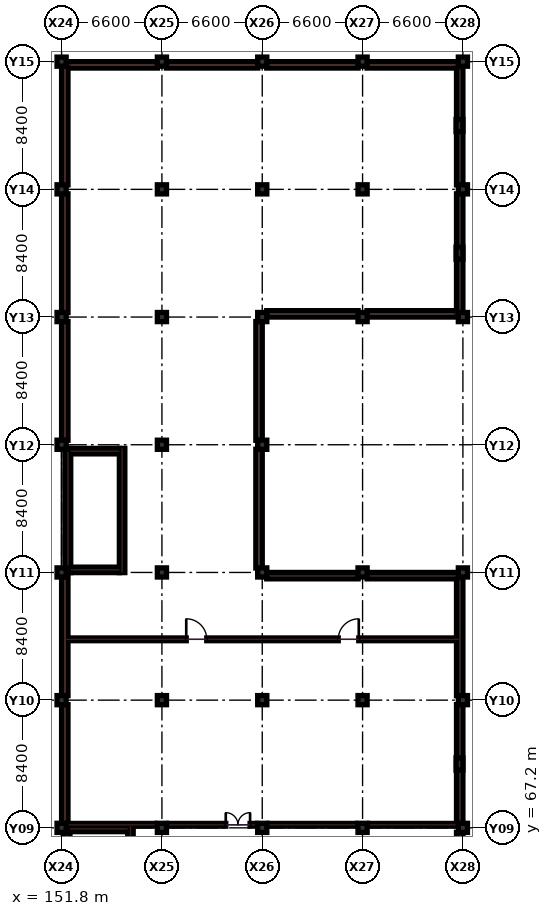
"""IFC4 building model, lengths in metres.
Left out: names, types, materials, properties, quantities, classifications, styles, units other than length and angle.
Written with IfcOpenShell. Run it as: python <this file> out.ifc"""

import sys

from ifc_helpers import new_model, si_unit, direction, frame, frame_2d, origin, origin_2d, place, context, subcontext, project, spatial, rectangle, extrude, element, fill, save


model = new_model("IFC4")
c1 = context("Model", 3, precision=1e-05, world=origin(), true_north=direction((0.0, 1.0)))
c2 = subcontext(c1, "Body", "Model", "MODEL_VIEW")
j1 = project(units=[si_unit("LENGTHUNIT", "METRE"), si_unit("PLANEANGLEUNIT", "RADIAN")], contexts=[c1])
p1 = place(None, origin())
s1 = spatial("IfcSite", under=j1, at=p1, CompositionType="ELEMENT")
p2 = place(p1, origin())
s2 = spatial("IfcBuilding", under=s1, at=p2, CompositionType="ELEMENT")
p3 = place(p2, frame((0.0, 0.0, -4.5)))
s3 = spatial("IfcBuildingStorey", under=s2, at=p3, CompositionType="ELEMENT", Elevation=-4.5)
for number, where, z_axis, x_axis in (
    (1, (151.8, 67.2, 0.0), (0.0, 0.0, 1.0), (1.0, 0.0, 0.0)),
    (2, (151.8, 75.6, 0.0), (0.0, 0.0, 1.0), (1.0, 0.0, 0.0)),
    (3, (151.8, 84.0, 0.0), (0.0, 0.0, 1.0), (1.0, 0.0, 0.0)),
    (4, (151.8, 92.4, 0.0), (0.0, 0.0, 1.0), (1.0, 0.0, 0.0)),
    (5, (151.8, 100.8, 0.0), (0.0, 0.0, 1.0), (1.0, 0.0, 0.0)),
    (6, (151.8, 109.2, 0.0), (0.0, 0.0, 1.0), (1.0, 0.0, 0.0)),
    (7, (151.8, 117.6, 0.0), (0.0, 0.0, 1.0), (1.0, 0.0, 0.0)),
    (8, (158.4, 67.2, 0.0), (0.0, 0.0, 1.0), (1.0, 0.0, 0.0)),
    (9, (158.4, 75.6, 0.0), (0.0, 0.0, 1.0), (1.0, 0.0, 0.0)),
    (10, (158.4, 84.0, 0.0), (0.0, 0.0, 1.0), (1.0, 0.0, 0.0)),
    (11, (158.4, 92.4, 0.0), (0.0, 0.0, 1.0), (1.0, 0.0, 0.0)),
    (12, (158.4, 100.8, 0.0), (0.0, 0.0, 1.0), (1.0, 0.0, 0.0)),
    (13, (158.4, 109.2, 0.0), (0.0, 0.0, 1.0), (1.0, 0.0, 0.0)),
    (14, (158.4, 117.6, 0.0), (0.0, 0.0, 1.0), (1.0, 0.0, 0.0)),
    (15, (165.0, 67.2, 0.0), (0.0, 0.0, 1.0), (1.0, 0.0, 0.0)),
    (16, (165.0, 75.6, 0.0), (0.0, 0.0, 1.0), (1.0, 0.0, 0.0)),
    (17, (165.0, 84.0, 0.0), (0.0, 0.0, 1.0), (1.0, 0.0, 0.0)),
    (18, (165.0, 92.4, 0.0), (0.0, 0.0, 1.0), (1.0, 0.0, 0.0)),
    (19, (165.0, 100.8, 0.0), (0.0, 0.0, 1.0), (1.0, 0.0, 0.0)),
    (20, (165.0, 109.2, 0.0), (0.0, 0.0, 1.0), (1.0, 0.0, 0.0)),
    (21, (165.0, 117.6, 0.0), (0.0, 0.0, 1.0), (1.0, 0.0, 0.0)),
    (22, (171.6, 67.2, 0.0), (0.0, 0.0, 1.0), (1.0, 0.0, 0.0)),
    (23, (171.6, 75.6, 0.0), (0.0, 0.0, 1.0), (1.0, 0.0, 0.0)),
    (24, (171.6, 84.0, 0.0), (0.0, 0.0, 1.0), (1.0, 0.0, 0.0)),
    (25, (171.6, 100.8, 0.0), (0.0, 0.0, 1.0), (1.0, 0.0, 0.0)),
    (26, (171.6, 109.2, 0.0), (0.0, 0.0, 1.0), (1.0, 0.0, 0.0)),
    (27, (171.6, 117.6, 0.0), (0.0, 0.0, 1.0), (1.0, 0.0, 0.0)),
    (28, (178.2, 67.2, 0.0), (0.0, 0.0, 1.0), (1.0, 0.0, 0.0)),
    (29, (178.2, 75.6, 0.0), (0.0, 0.0, 1.0), (1.0, 0.0, 0.0)),
    (30, (178.2, 84.0, 0.0), (0.0, 0.0, 1.0), (1.0, 0.0, 0.0)),
    (31, (178.2, 100.8, 0.0), (0.0, 0.0, 1.0), (1.0, 0.0, 0.0)),
    (32, (178.2, 109.2, 0.0), (0.0, 0.0, 1.0), (1.0, 0.0, 0.0)),
    (33, (178.2, 117.6, 0.0), (0.0, 0.0, 1.0), (1.0, 0.0, 0.0)),
):
    element("IfcColumn", number, at=place(p3, frame(where, z_axis=z_axis, x_axis=x_axis)), inside=s3, PredefinedType="COLUMN", context=c2, shape_type="SweptSolid", body=[
        extrude(rectangle(XDim=0.6, YDim=0.6, at=origin_2d()), origin(), (0.0, 0.0, 1.0), 4.5),
    ])
for number, where, z_axis, x_axis in (
    (34, (177.975, 71.4, 0.0), (0.0, 0.0, 1.0), (1.0, 0.0, 0.0)),
    (35, (177.975, 105.0, 0.0), (0.0, 0.0, 1.0), (1.0, 0.0, 0.0)),
    (36, (177.975, 113.4, 0.0), (0.0, 0.0, 1.0), (1.0, 0.0, 0.0)),
):
    element("IfcColumn", number, at=place(p3, frame(where, z_axis=z_axis, x_axis=x_axis)), inside=s3, PredefinedType="PILASTER", context=c2, shape_type="SweptSolid", body=[
        extrude(rectangle(XDim=0.45, YDim=0.8, at=origin_2d()), origin(), (0.0, 0.0, 1.0), 4.5),
    ])
p4 = place(p3, frame((152.0, 67.4, 0.0), z_axis=(0.0, 0.0, 1.0), x_axis=(1.0, 0.0, 0.0)))
e37 = element("IfcWall", 37, at=p4, inside=s3, PredefinedType="SOLIDWALL", context=c2, shape_type="SweptSolid", body=[
    extrude(rectangle(XDim=5.95, YDim=0.18, at=frame_2d((2.975, 0.0))), origin(), (0.0, 0.0, 1.0), 3.29),
])
p5 = place(p3, frame((158.85, 67.4, 0.0), z_axis=(0.0, 0.0, 1.0), x_axis=(1.0, 0.0, 0.0)))
e38 = element("IfcWall", 38, at=p5, inside=s3, PredefinedType="SOLIDWALL", context=c2, shape_type="SweptSolid", body=[
    extrude(rectangle(XDim=5.7, YDim=0.18, at=frame_2d((2.85, 0.0))), origin(), (0.0, 0.0, 1.0), 3.275),
])
p6 = place(p5, frame((3.75, 0.0, 0.0)))
e39 = element("IfcOpeningElement", 39, at=p6, cuts=e38, PredefinedType="OPENING", context=c2, shape_type="SweptSolid", body=[
    extrude(rectangle(XDim=1.6, YDim=2.2, at=frame_2d((0.8, 1.1))), frame((0.0, 0.1, 0.0), z_axis=(0.0, -1.0, 0.0), x_axis=(1.0, 0.0, 0.0)), (0.0, 0.0, 1.0), 0.2),
])
p7 = place(p3, frame((165.45, 67.4, 0.0), z_axis=(0.0, 0.0, 1.0), x_axis=(1.0, 0.0, 0.0)))
e40 = element("IfcWall", 40, at=p7, inside=s3, PredefinedType="SOLIDWALL", context=c2, shape_type="SweptSolid", body=[
    extrude(rectangle(XDim=5.7, YDim=0.18, at=frame_2d((2.85, 0.0))), origin(), (0.0, 0.0, 1.0), 3.275),
])
p8 = place(p3, frame((172.05, 67.4, 0.0), z_axis=(0.0, 0.0, 1.0), x_axis=(1.0, 0.0, 0.0)))
e41 = element("IfcWall", 41, at=p8, inside=s3, PredefinedType="SOLIDWALL", context=c2, shape_type="SweptSolid", body=[
    extrude(rectangle(XDim=5.95, YDim=0.18, at=frame_2d((2.975, 0.0))), origin(), (0.0, 0.0, 1.0), 3.275),
])
p9 = place(p3, frame((152.0, 79.6, 0.0), z_axis=(0.0, 0.0, 1.0), x_axis=(1.0, 0.0, 0.0)))
e42 = element("IfcWall", 42, at=p9, inside=s3, PredefinedType="SOLIDWALL", context=c2, shape_type="SweptSolid", body=[
    extrude(rectangle(XDim=26.0, YDim=0.18, at=frame_2d((13.0, 0.0))), origin(), (0.0, 0.0, 1.0), 3.29),
])
p10 = place(p9, frame((8.0, 0.0, 0.0)))
e43 = element("IfcOpeningElement", 43, at=p10, cuts=e42, PredefinedType="OPENING", context=c2, shape_type="SweptSolid", body=[
    extrude(rectangle(XDim=1.35, YDim=2.2, at=frame_2d((0.675, 1.1))), frame((0.0, 0.1, 0.0), z_axis=(0.0, -1.0, 0.0), x_axis=(1.0, 0.0, 0.0)), (0.0, 0.0, 1.0), 0.2),
])
p11 = place(p9, frame((18.0, 0.0, 0.0)))
e44 = element("IfcOpeningElement", 44, at=p11, cuts=e42, PredefinedType="OPENING", context=c2, shape_type="SweptSolid", body=[
    extrude(rectangle(XDim=1.35, YDim=2.2, at=frame_2d((0.675, 1.1))), frame((0.0, 0.1, 0.0), z_axis=(0.0, -1.0, 0.0), x_axis=(1.0, 0.0, 0.0)), (0.0, 0.0, 1.0), 0.2),
])
p12 = place(p3, frame((152.01, 75.305, 0.0), z_axis=(0.0, 0.0, 1.0), x_axis=(0.0, -1.0, 0.0)))
e45 = element("IfcWall", 45, at=p12, inside=s3, PredefinedType="SOLIDWALL", context=c2, shape_type="SweptSolid", body=[
    extrude(rectangle(XDim=7.81, YDim=0.42, at=frame_2d((3.905, 0.0))), origin(), (0.0, 0.0, 1.0), 4.14),
])
p13 = place(p3, frame((152.01, 83.705, 0.0), z_axis=(0.0, 0.0, 1.0), x_axis=(0.0, -1.0, 0.0)))
e46 = element("IfcWall", 46, at=p13, inside=s3, PredefinedType="SOLIDWALL", context=c2, shape_type="SweptSolid", body=[
    extrude(rectangle(XDim=7.81, YDim=0.42, at=frame_2d((3.905, 0.0))), origin(), (0.0, 0.0, 1.0), 4.14),
])
p14 = place(p3, frame((152.01, 100.505, 0.0), z_axis=(0.0, 0.0, 1.0), x_axis=(0.0, -1.0, 0.0)))
e47 = element("IfcWall", 47, at=p14, inside=s3, PredefinedType="SOLIDWALL", context=c2, shape_type="SweptSolid", body=[
    extrude(rectangle(XDim=7.81, YDim=0.42, at=frame_2d((3.905, 0.0))), origin(), (0.0, 0.0, 1.0), 4.14),
])
p15 = place(p3, frame((152.01, 108.905, 0.0), z_axis=(0.0, 0.0, 1.0), x_axis=(0.0, -1.0, 0.0)))
e48 = element("IfcWall", 48, at=p15, inside=s3, PredefinedType="SOLIDWALL", context=c2, shape_type="SweptSolid", body=[
    extrude(rectangle(XDim=7.81, YDim=0.42, at=frame_2d((3.905, 0.0))), origin(), (0.0, 0.0, 1.0), 4.14),
])
p16 = place(p3, frame((158.105, 117.39, 0.0), z_axis=(0.0, 0.0, 1.0), x_axis=(-1.0, 0.0, 0.0)))
e49 = element("IfcWall", 49, at=p16, inside=s3, PredefinedType="SOLIDWALL", context=c2, shape_type="SweptSolid", body=[
    extrude(rectangle(XDim=6.01, YDim=0.42, at=frame_2d((3.005, 0.0))), origin(), (0.0, 0.0, 1.0), 4.14),
])
p17 = place(p3, frame((152.01, 117.305, 0.0), z_axis=(0.0, 0.0, 1.0), x_axis=(0.0, -1.0, 0.0)))
e50 = element("IfcWall", 50, at=p17, inside=s3, PredefinedType="SOLIDWALL", context=c2, shape_type="SweptSolid", body=[
    extrude(rectangle(XDim=7.81, YDim=0.42, at=frame_2d((3.905, 0.0))), origin(), (0.0, 0.0, 1.0), 4.14),
])
p18 = place(p3, frame((164.79, 84.295, 0.0), z_axis=(0.0, 0.0, 1.0), x_axis=(0.0, 1.0, 0.0)))
e51 = element("IfcWall", 51, at=p18, inside=s3, PredefinedType="SOLIDWALL", context=c2, shape_type="SweptSolid", body=[
    extrude(rectangle(XDim=7.81, YDim=0.42, at=frame_2d((3.905, 0.0))), origin(), (0.0, 0.0, 1.0), 4.14),
])
p19 = place(p3, frame((164.79, 92.695, 0.0), z_axis=(0.0, 0.0, 1.0), x_axis=(0.0, 1.0, 0.0)))
e52 = element("IfcWall", 52, at=p19, inside=s3, PredefinedType="SOLIDWALL", context=c2, shape_type="SweptSolid", body=[
    extrude(rectangle(XDim=7.81, YDim=0.42, at=frame_2d((3.905, 0.0))), origin(), (0.0, 0.0, 1.0), 4.14),
])
for number, where, z_axis, x_axis in (
    (53, (164.705, 117.39, 0.0), (0.0, 0.0, 1.0), (-1.0, 0.0, 0.0)),
    (54, (171.305, 83.79, 0.0), (0.0, 0.0, 1.0), (-1.0, 0.0, 0.0)),
    (55, (165.295, 101.01, 0.0), (0.0, 0.0, 1.0), (1.0, 0.0, 0.0)),
    (56, (171.305, 117.39, 0.0), (0.0, 0.0, 1.0), (-1.0, 0.0, 0.0)),
):
    element("IfcWall", number, at=place(p3, frame(where, z_axis=z_axis, x_axis=x_axis)), inside=s3, PredefinedType="SOLIDWALL", context=c2, shape_type="SweptSolid", body=[
        extrude(rectangle(XDim=6.01, YDim=0.42, at=frame_2d((3.005, 0.0))), origin(), (0.0, 0.0, 1.0), 4.14),
    ])
p20 = place(p3, frame((177.99, 59.195, 0.0), z_axis=(0.0, 0.0, 1.0), x_axis=(0.0, 1.0, 0.0)))
e57 = element("IfcWall", 57, at=p20, inside=s3, PredefinedType="SOLIDWALL", context=c2, shape_type="SweptSolid", body=[
    extrude(rectangle(XDim=7.71, YDim=0.42, at=frame_2d((3.855, 0.0))), origin(), (0.0, 0.0, 1.0), 4.14),
])
p21 = place(p3, frame((177.99, 67.495, 0.0), z_axis=(0.0, 0.0, 1.0), x_axis=(0.0, 1.0, 0.0)))
e58 = element("IfcWall", 58, at=p21, inside=s3, PredefinedType="SOLIDWALL", context=c2, shape_type="SweptSolid", body=[
    extrude(rectangle(XDim=7.81, YDim=0.42, at=frame_2d((3.905, 0.0))), origin(), (0.0, 0.0, 1.0), 4.14),
])
p22 = place(p3, frame((177.99, 75.895, 0.0), z_axis=(0.0, 0.0, 1.0), x_axis=(0.0, 1.0, 0.0)))
e59 = element("IfcWall", 59, at=p22, inside=s3, PredefinedType="SOLIDWALL", context=c2, shape_type="SweptSolid", body=[
    extrude(rectangle(XDim=7.81, YDim=0.42, at=frame_2d((3.905, 0.0))), origin(), (0.0, 0.0, 1.0), 4.14),
])
for number, where, z_axis, x_axis in (
    (60, (177.905, 83.79, 0.0), (0.0, 0.0, 1.0), (-1.0, 0.0, 0.0)),
    (61, (171.895, 101.01, 0.0), (0.0, 0.0, 1.0), (1.0, 0.0, 0.0)),
):
    element("IfcWall", number, at=place(p3, frame(where, z_axis=z_axis, x_axis=x_axis)), inside=s3, PredefinedType="SOLIDWALL", context=c2, shape_type="SweptSolid", body=[
        extrude(rectangle(XDim=6.01, YDim=0.42, at=frame_2d((3.005, 0.0))), origin(), (0.0, 0.0, 1.0), 4.14),
    ])
p23 = place(p3, frame((177.99, 101.095, 0.0), z_axis=(0.0, 0.0, 1.0), x_axis=(0.0, 1.0, 0.0)))
e62 = element("IfcWall", 62, at=p23, inside=s3, PredefinedType="SOLIDWALL", context=c2, shape_type="SweptSolid", body=[
    extrude(rectangle(XDim=7.81, YDim=0.42, at=frame_2d((3.905, 0.0))), origin(), (0.0, 0.0, 1.0), 4.14),
])
p24 = place(p3, frame((177.99, 109.495, 0.0), z_axis=(0.0, 0.0, 1.0), x_axis=(0.0, 1.0, 0.0)))
e63 = element("IfcWall", 63, at=p24, inside=s3, PredefinedType="SOLIDWALL", context=c2, shape_type="SweptSolid", body=[
    extrude(rectangle(XDim=7.81, YDim=0.42, at=frame_2d((3.905, 0.0))), origin(), (0.0, 0.0, 1.0), 4.14),
])
p25 = place(p3, frame((177.905, 117.39, 0.0), z_axis=(0.0, 0.0, 1.0), x_axis=(-1.0, 0.0, 0.0)))
e64 = element("IfcWall", 64, at=p25, inside=s3, PredefinedType="SOLIDWALL", context=c2, shape_type="SweptSolid", body=[
    extrude(rectangle(XDim=6.01, YDim=0.42, at=frame_2d((3.005, 0.0))), origin(), (0.0, 0.0, 1.0), 4.14),
])
p26 = place(p3, frame((152.17, 58.69, 0.0), z_axis=(0.0, 0.0, 1.0), x_axis=(0.0, 1.0, 0.0)))
e65 = element("IfcWall", 65, at=p26, inside=s3, PredefinedType="SHEAR", context=c2, shape_type="SweptSolid", body=[
    extrude(rectangle(XDim=8.62, YDim=0.36, at=frame_2d((4.31, 0.0))), origin(), (0.0, 0.0, 1.0), 4.14),
])
p27 = place(p3, frame((156.33, 58.69, 0.0), z_axis=(0.0, 0.0, 1.0), x_axis=(0.0, 1.0, 0.0)))
e66 = element("IfcWall", 66, at=p27, inside=s3, PredefinedType="SHEAR", context=c2, shape_type="SweptSolid", body=[
    extrude(rectangle(XDim=8.62, YDim=0.36, at=frame_2d((4.31, 0.0))), origin(), (0.0, 0.0, 1.0), 4.14),
])
p28 = place(p27, frame((0.45, 0.0, 0.0)))
e67 = element("IfcOpeningElement", 67, at=p28, cuts=e66, PredefinedType="OPENING", context=c2, shape_type="SweptSolid", body=[
    extrude(rectangle(XDim=1.25, YDim=2.15, at=frame_2d((0.625, 1.075))), frame((0.0, 0.19, 0.0), z_axis=(0.0, -1.0, 0.0), x_axis=(1.0, 0.0, 0.0)), (0.0, 0.0, 1.0), 0.38),
])
p29 = place(p3, frame((152.35, 67.13, 0.0), z_axis=(0.0, 0.0, 1.0), x_axis=(1.0, 0.0, 0.0)))
e68 = element("IfcWall", 68, at=p29, inside=s3, PredefinedType="SHEAR", context=c2, shape_type="SweptSolid", body=[
    extrude(rectangle(XDim=3.8, YDim=0.36, at=frame_2d((1.9, 0.0))), origin(), (0.0, 0.0, 1.0), 4.14),
])
for number, where, z_axis, x_axis in (
    (69, (152.22, 83.99, 0.0), (0.0, 0.0, 1.0), (0.0, 1.0, 0.0)),
    (70, (155.78, 83.99, 0.0), (0.0, 0.0, 1.0), (0.0, 1.0, 0.0)),
):
    element("IfcWall", number, at=place(p3, frame(where, z_axis=z_axis, x_axis=x_axis)), inside=s3, PredefinedType="SHEAR", context=c2, shape_type="SweptSolid", body=[
        extrude(rectangle(XDim=8.17, YDim=0.36, at=frame_2d((4.085, 0.0))), origin(), (0.0, 0.0, 1.0), 4.14),
    ])
for number, where, z_axis, x_axis in (
    (71, (152.4, 91.98, 0.0), (0.0, 0.0, 1.0), (1.0, 0.0, 0.0)),
    (72, (152.4, 84.17, 0.0), (0.0, 0.0, 1.0), (1.0, 0.0, 0.0)),
):
    element("IfcWall", number, at=place(p3, frame(where, z_axis=z_axis, x_axis=x_axis)), inside=s3, PredefinedType="SHEAR", context=c2, shape_type="SweptSolid", body=[
        extrude(rectangle(XDim=3.2, YDim=0.36, at=frame_2d((1.6, 0.0))), origin(), (0.0, 0.0, 1.0), 4.14),
    ])
p30 = place(p6, origin())
e73 = element("IfcDoor", 73, at=p30, inside=s3, OperationType="DOUBLE_DOOR_SINGLE_SWING", PredefinedType="DOOR", context=c2, shape_type="SweptSolid", body=[
    extrude(rectangle(XDim=1.6, YDim=2.2, at=frame_2d((0.8, 1.1))), frame((0.0, 0.025, 0.0), z_axis=(0.0, -1.0, 0.0), x_axis=(1.0, 0.0, 0.0)), (0.0, 0.0, 1.0), 0.05),
])
fill(e39, e73)
p31 = place(p10, origin())
e74 = element("IfcDoor", 74, at=p31, inside=s3, OperationType="SINGLE_SWING_LEFT", PredefinedType="DOOR", context=c2, shape_type="SweptSolid", body=[
    extrude(rectangle(XDim=1.35, YDim=2.2, at=frame_2d((0.675, 1.1))), frame((0.0, 0.025, 0.0), z_axis=(0.0, -1.0, 0.0), x_axis=(1.0, 0.0, 0.0)), (0.0, 0.0, 1.0), 0.05),
])
fill(e43, e74)
p32 = place(p11, origin())
e75 = element("IfcDoor", 75, at=p32, inside=s3, OperationType="SINGLE_SWING_RIGHT", PredefinedType="DOOR", context=c2, shape_type="SweptSolid", body=[
    extrude(rectangle(XDim=1.35, YDim=2.2, at=frame_2d((0.675, 1.1))), frame((0.0, 0.025, 0.0), z_axis=(0.0, -1.0, 0.0), x_axis=(1.0, 0.0, 0.0)), (0.0, 0.0, 1.0), 0.05),
])
fill(e44, e75)
save(model, sys.argv[1])
